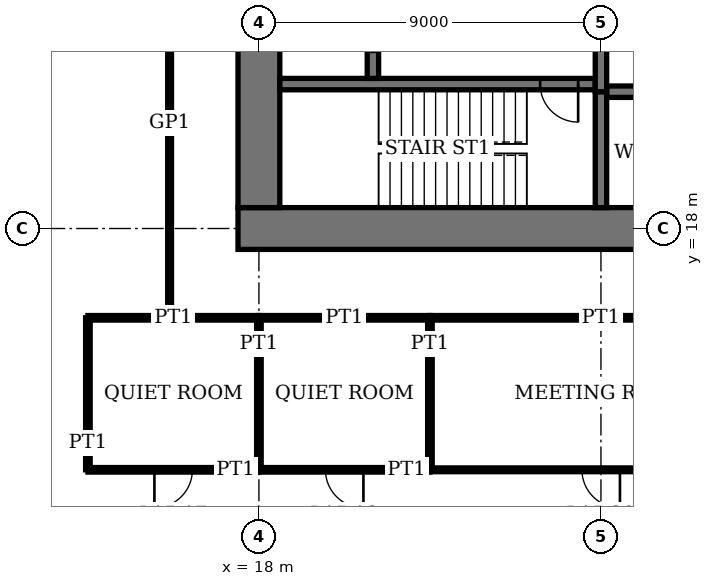
"""IFC4 building model, lengths in metres.
Left out: names, types, materials, properties, quantities, classifications, styles, units other than length and angle.
Written with IfcOpenShell. Run it as: python <this file> out.ifc"""

import sys

from ifc_helpers import new_model, si_unit, direction, frame, frame_2d, origin, place, context, subcontext, project, spatial, rectangle, extrude, element, fill, save


model = new_model("IFC4")
c1 = context("Model", 3, precision=1e-05, world=origin(), true_north=direction((0.0, 1.0)))
c2 = subcontext(c1, "Body", "Model", "MODEL_VIEW")
j1 = project(units=[si_unit("LENGTHUNIT", "METRE"), si_unit("PLANEANGLEUNIT", "RADIAN")], contexts=[c1])
p1 = place(None, origin())
s1 = spatial("IfcSite", under=j1, at=p1, CompositionType="ELEMENT")
p2 = place(p1, origin())
s2 = spatial("IfcBuilding", under=s1, at=p2, CompositionType="ELEMENT")
p3 = place(p2, frame((0.0, 0.0, 63.8)))
s3 = spatial("IfcBuildingStorey", under=s2, at=p3, CompositionType="ELEMENT", Elevation=63.8)
p4 = place(p3, frame((17.45, 18.0, 0.0), z_axis=(0.0, 0.0, 1.0), x_axis=(1.0, 0.0, 0.0)))
e1 = element("IfcWall", 1, at=p4, inside=s3, PredefinedType="SHEAR", context=c2, shape_type="SweptSolid", body=[
    extrude(rectangle(XDim=28.1, YDim=1.1, at=frame_2d((14.05, 0.0))), origin(), (0.0, 0.0, 1.0), 4.0),
])
p5 = place(p4, frame((11.55, 0.0, 0.0)))
e2 = element("IfcOpeningElement", 2, at=p5, cuts=e1, PredefinedType="OPENING", context=c2, shape_type="SweptSolid", body=[
    extrude(rectangle(XDim=1.0, YDim=2.4, at=frame_2d((0.5, 1.2))), frame((0.0, 0.56, 0.0), z_axis=(0.0, -1.0, 0.0), x_axis=(1.0, 0.0, 0.0)), (0.0, 0.0, 1.0), 1.12),
])
p6 = place(p4, frame((16.55, 0.0, 0.0)))
e3 = element("IfcOpeningElement", 3, at=p6, cuts=e1, PredefinedType="OPENING", context=c2, shape_type="SweptSolid", body=[
    extrude(rectangle(XDim=1.0, YDim=2.4, at=frame_2d((0.5, 1.2))), frame((0.0, 0.56, 0.0), z_axis=(0.0, -1.0, 0.0), x_axis=(1.0, 0.0, 0.0)), (0.0, 0.0, 1.0), 1.12),
])
p7 = place(p4, frame((20.0, 0.0, 0.0)))
e4 = element("IfcOpeningElement", 4, at=p7, cuts=e1, PredefinedType="OPENING", context=c2, shape_type="SweptSolid", body=[
    extrude(rectangle(XDim=1.1, YDim=2.4, at=frame_2d((0.55, 1.2))), frame((0.0, 0.56, 0.0), z_axis=(0.0, -1.0, 0.0), x_axis=(1.0, 0.0, 0.0)), (0.0, 0.0, 1.0), 1.12),
])
p8 = place(p4, frame((24.05, 0.0, 0.0)))
e5 = element("IfcOpeningElement", 5, at=p8, cuts=e1, PredefinedType="OPENING", context=c2, shape_type="SweptSolid", body=[
    extrude(rectangle(XDim=1.0, YDim=2.4, at=frame_2d((0.5, 1.2))), frame((0.0, 0.56, 0.0), z_axis=(0.0, -1.0, 0.0), x_axis=(1.0, 0.0, 0.0)), (0.0, 0.0, 1.0), 1.12),
])
p9 = place(p3, frame((18.0, 35.45, 0.0), z_axis=(0.0, 0.0, 1.0), x_axis=(0.0, -1.0, 0.0)))
e6 = element("IfcWall", 6, at=p9, inside=s3, PredefinedType="SHEAR", context=c2, shape_type="SweptSolid", body=[
    extrude(rectangle(XDim=16.9, YDim=1.1, at=frame_2d((8.45, 0.0))), origin(), (0.0, 0.0, 1.0), 4.0),
])
p10 = place(p9, frame((8.45, 0.0, 0.0)))
e7 = element("IfcOpeningElement", 7, at=p10, cuts=e6, PredefinedType="OPENING", context=c2, shape_type="SweptSolid", body=[
    extrude(rectangle(XDim=1.8, YDim=2.4, at=frame_2d((0.9, 1.2))), frame((0.0, 0.56, 0.0), z_axis=(0.0, -1.0, 0.0), x_axis=(1.0, 0.0, 0.0)), (0.0, 0.0, 1.0), 1.12),
])
p11 = place(p3, frame((18.55, 21.8, 0.0), z_axis=(0.0, 0.0, 1.0), x_axis=(1.0, 0.0, 0.0)))
e8 = element("IfcWall", 8, at=p11, inside=s3, PredefinedType="SHEAR", context=c2, shape_type="SweptSolid", body=[
    extrude(rectangle(XDim=8.3, YDim=0.3, at=frame_2d((4.15, 0.0))), origin(), (0.0, 0.0, 1.0), 4.0),
])
p12 = place(p11, frame((6.85, 0.0, 0.0)))
e9 = element("IfcOpeningElement", 9, at=p12, cuts=e8, PredefinedType="OPENING", context=c2, shape_type="SweptSolid", body=[
    extrude(rectangle(XDim=1.0, YDim=2.4, at=frame_2d((0.5, 1.2))), frame((0.0, 0.16, 0.0), z_axis=(0.0, -1.0, 0.0), x_axis=(1.0, 0.0, 0.0)), (0.0, 0.0, 1.0), 0.32),
])
p13 = place(p3, frame((27.0, 18.55, 0.0), z_axis=(0.0, 0.0, 1.0), x_axis=(0.0, 1.0, 0.0)))
e10 = element("IfcWall", 10, at=p13, inside=s3, PredefinedType="SHEAR", context=c2, shape_type="SweptSolid", body=[
    extrude(rectangle(XDim=3.05, YDim=0.3, at=frame_2d((1.525, 0.0))), origin(), (0.0, 0.0, 1.0), 4.0),
])
p14 = place(p3, frame((21.0, 21.95, 0.0), z_axis=(0.0, 0.0, 1.0), x_axis=(0.0, 1.0, 0.0)))
e11 = element("IfcWall", 11, at=p14, inside=s3, PredefinedType="SHEAR", context=c2, shape_type="SweptSolid", body=[
    extrude(rectangle(XDim=2.5, YDim=0.3, at=frame_2d((1.25, 0.0))), origin(), (0.0, 0.0, 1.0), 4.0),
])
p15 = place(p14, frame((0.7, 0.0, 0.0)))
e12 = element("IfcOpeningElement", 12, at=p15, cuts=e11, PredefinedType="OPENING", context=c2, shape_type="SweptSolid", body=[
    extrude(rectangle(XDim=1.1, YDim=2.4, at=frame_2d((0.55, 1.2))), frame((0.0, 0.16, 0.0), z_axis=(0.0, -1.0, 0.0), x_axis=(1.0, 0.0, 0.0)), (0.0, 0.0, 1.0), 0.32),
])
p16 = place(p3, frame((27.15, 21.6, 0.0), z_axis=(0.0, 0.0, 1.0), x_axis=(1.0, 0.0, 0.0)))
e13 = element("IfcWall", 13, at=p16, inside=s3, PredefinedType="SHEAR", context=c2, shape_type="SweptSolid", body=[
    extrude(rectangle(XDim=17.3, YDim=0.3, at=frame_2d((8.65, 0.0))), origin(), (0.0, 0.0, 1.0), 4.0),
])
p17 = place(p3, frame((27.0, 21.6, 0.0), z_axis=(0.0, 0.0, 1.0), x_axis=(0.0, 1.0, 0.0)))
e14 = element("IfcWall", 14, at=p17, inside=s3, PredefinedType="SHEAR", context=c2, shape_type="SweptSolid", body=[
    extrude(rectangle(XDim=2.85, YDim=0.3, at=frame_2d((1.425, 0.0))), origin(), (0.0, 0.0, 1.0), 4.0),
])
p18 = place(p3, frame((13.5, 11.65, 0.0), z_axis=(0.0, 0.0, 1.0), x_axis=(1.0, 0.0, 0.0)))
e15 = element("IfcWall", 15, at=p18, inside=s3, PredefinedType="PARTITIONING", context=c2, shape_type="SweptSolid", body=[
    extrude(rectangle(XDim=4.5, YDim=0.12, at=frame_2d((2.25, 0.0))), origin(), (0.0, 0.0, 1.0), 3.75),
])
p19 = place(p18, frame((1.75, 0.0, 0.0)))
e16 = element("IfcOpeningElement", 16, at=p19, cuts=e15, PredefinedType="OPENING", context=c2, shape_type="SweptSolid", body=[
    extrude(rectangle(XDim=1.0, YDim=2.4, at=frame_2d((0.5, 1.2))), frame((0.0, 0.07, 0.0), z_axis=(0.0, -1.0, 0.0), x_axis=(1.0, 0.0, 0.0)), (0.0, 0.0, 1.0), 0.14),
])
p20 = place(p3, frame((18.0, 11.65, 0.0), z_axis=(0.0, 0.0, 1.0), x_axis=(1.0, 0.0, 0.0)))
e17 = element("IfcWall", 17, at=p20, inside=s3, PredefinedType="PARTITIONING", context=c2, shape_type="SweptSolid", body=[
    extrude(rectangle(XDim=4.5, YDim=0.12, at=frame_2d((2.25, 0.0))), origin(), (0.0, 0.0, 1.0), 3.75),
])
p21 = place(p20, frame((1.75, 0.0, 0.0)))
e18 = element("IfcOpeningElement", 18, at=p21, cuts=e17, PredefinedType="OPENING", context=c2, shape_type="SweptSolid", body=[
    extrude(rectangle(XDim=1.0, YDim=2.4, at=frame_2d((0.5, 1.2))), frame((0.0, 0.07, 0.0), z_axis=(0.0, -1.0, 0.0), x_axis=(1.0, 0.0, 0.0)), (0.0, 0.0, 1.0), 0.14),
])
p22 = place(p3, frame((22.5, 11.65, 0.0), z_axis=(0.0, 0.0, 1.0), x_axis=(1.0, 0.0, 0.0)))
e19 = element("IfcWall", 19, at=p22, inside=s3, PredefinedType="PARTITIONING", context=c2, shape_type="SweptSolid", body=[
    extrude(rectangle(XDim=9.0, YDim=0.1, at=frame_2d((4.5, 0.0))), origin(), (0.0, 0.0, 1.0), 3.75),
])
p23 = place(p22, frame((4.0, 0.0, 0.0)))
e20 = element("IfcOpeningElement", 20, at=p23, cuts=e19, PredefinedType="OPENING", context=c2, shape_type="SweptSolid", body=[
    extrude(rectangle(XDim=1.0, YDim=2.4, at=frame_2d((0.5, 1.2))), frame((0.0, 0.06, 0.0), z_axis=(0.0, -1.0, 0.0), x_axis=(1.0, 0.0, 0.0)), (0.0, 0.0, 1.0), 0.12),
])
for number, where, z_axis, x_axis in (
    (21, (13.5, 15.65, 0.0), (0.0, 0.0, 1.0), (1.0, 0.0, 0.0)),
    (22, (18.0, 15.65, 0.0), (0.0, 0.0, 1.0), (1.0, 0.0, 0.0)),
):
    element("IfcWall", number, at=place(p3, frame(where, z_axis=z_axis, x_axis=x_axis)), inside=s3, PredefinedType="PARTITIONING", context=c2, shape_type="SweptSolid", body=[
        extrude(rectangle(XDim=4.5, YDim=0.12, at=frame_2d((2.25, 0.0))), origin(), (0.0, 0.0, 1.0), 3.75),
    ])
p24 = place(p3, frame((22.5, 15.65, 0.0), z_axis=(0.0, 0.0, 1.0), x_axis=(1.0, 0.0, 0.0)))
e23 = element("IfcWall", 23, at=p24, inside=s3, PredefinedType="PARTITIONING", context=c2, shape_type="SweptSolid", body=[
    extrude(rectangle(XDim=9.0, YDim=0.12, at=frame_2d((4.5, 0.0))), origin(), (0.0, 0.0, 1.0), 3.75),
])
p25 = place(p3, frame((13.5, 11.65, 0.0), z_axis=(0.0, 0.0, 1.0), x_axis=(0.0, 1.0, 0.0)))
e24 = element("IfcWall", 24, at=p25, inside=s3, PredefinedType="PARTITIONING", context=c2, shape_type="SweptSolid", body=[
    extrude(rectangle(XDim=4.0, YDim=0.12, at=frame_2d((2.0, 0.0))), origin(), (0.0, 0.0, 1.0), 3.75),
])
p26 = place(p3, frame((15.65, 15.65, 0.0), z_axis=(0.0, 0.0, 1.0), x_axis=(0.0, 1.0, 0.0)))
e25 = element("IfcWall", 25, at=p26, inside=s3, PredefinedType="PARTITIONING", context=c2, shape_type="SweptSolid", body=[
    extrude(rectangle(XDim=20.9, YDim=0.1, at=frame_2d((10.45, 0.0))), origin(), (0.0, 0.0, 1.0), 3.75),
])
p27 = place(p26, frame((9.95, 0.0, 0.0)))
e26 = element("IfcOpeningElement", 26, at=p27, cuts=e25, PredefinedType="OPENING", context=c2, shape_type="SweptSolid", body=[
    extrude(rectangle(XDim=1.0, YDim=2.4, at=frame_2d((0.5, 1.2))), frame((0.0, 0.06, 0.0), z_axis=(0.0, -1.0, 0.0), x_axis=(1.0, 0.0, 0.0)), (0.0, 0.0, 1.0), 0.12),
])
p28 = place(p3, frame((18.0, 11.65, 0.0), z_axis=(0.0, 0.0, 1.0), x_axis=(0.0, 1.0, 0.0)))
e27 = element("IfcWall", 27, at=p28, inside=s3, PredefinedType="PARTITIONING", context=c2, shape_type="SweptSolid", body=[
    extrude(rectangle(XDim=4.0, YDim=0.12, at=frame_2d((2.0, 0.0))), origin(), (0.0, 0.0, 1.0), 3.05),
])
p29 = place(p3, frame((22.5, 11.65, 0.0), z_axis=(0.0, 0.0, 1.0), x_axis=(0.0, 1.0, 0.0)))
e28 = element("IfcWall", 28, at=p29, inside=s3, PredefinedType="PARTITIONING", context=c2, shape_type="SweptSolid", body=[
    extrude(rectangle(XDim=4.0, YDim=0.12, at=frame_2d((2.0, 0.0))), origin(), (0.0, 0.0, 1.0), 3.75),
])
p30 = place(p12, origin())
e29 = element("IfcDoor", 29, at=p30, inside=s3, OperationType="SINGLE_SWING_RIGHT", PredefinedType="DOOR", context=c2, shape_type="SweptSolid", body=[
    extrude(rectangle(XDim=1.0, YDim=2.4, at=frame_2d((0.5, 1.2))), frame((0.0, 0.03, 0.0), z_axis=(0.0, -1.0, 0.0), x_axis=(1.0, 0.0, 0.0)), (0.0, 0.0, 1.0), 0.06),
])
fill(e9, e29)
p31 = place(p19, origin())
e30 = element("IfcDoor", 30, at=p31, inside=s3, OperationType="SINGLE_SWING_LEFT", PredefinedType="DOOR", context=c2, shape_type="SweptSolid", body=[
    extrude(rectangle(XDim=1.0, YDim=2.4, at=frame_2d((0.5, 1.2))), frame((0.0, 0.025, 0.0), z_axis=(0.0, -1.0, 0.0), x_axis=(1.0, 0.0, 0.0)), (0.0, 0.0, 1.0), 0.05),
])
fill(e16, e30)
p32 = place(p21, origin())
e31 = element("IfcDoor", 31, at=p32, inside=s3, OperationType="SINGLE_SWING_RIGHT", PredefinedType="DOOR", context=c2, shape_type="SweptSolid", body=[
    extrude(rectangle(XDim=1.0, YDim=2.4, at=frame_2d((0.5, 1.2))), frame((0.0, 0.025, 0.0), z_axis=(0.0, -1.0, 0.0), x_axis=(1.0, 0.0, 0.0)), (0.0, 0.0, 1.0), 0.05),
])
fill(e18, e31)
p33 = place(p23, origin())
e32 = element("IfcDoor", 32, at=p33, inside=s3, OperationType="SINGLE_SWING_RIGHT", PredefinedType="DOOR", context=c2, shape_type="SweptSolid", body=[
    extrude(rectangle(XDim=1.0, YDim=2.4, at=frame_2d((0.5, 1.2))), frame((0.0, 0.02, 0.0), z_axis=(0.0, -1.0, 0.0), x_axis=(1.0, 0.0, 0.0)), (0.0, 0.0, 1.0), 0.04),
])
fill(e20, e32)
save(model, sys.argv[1])
